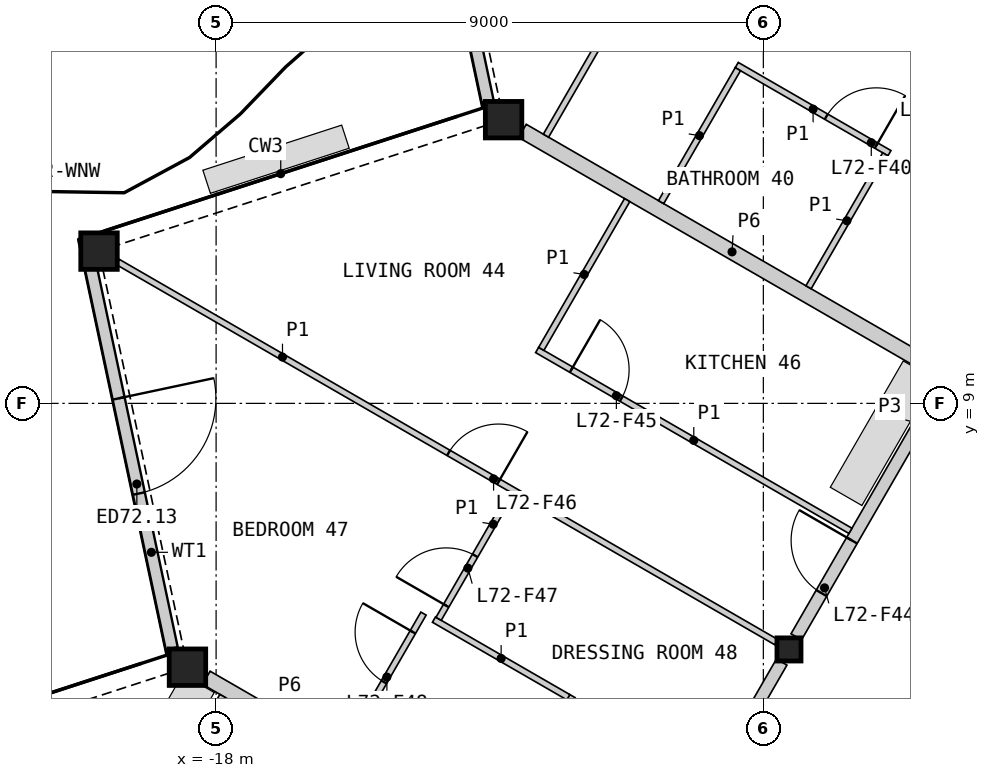
"""IFC4 building model, lengths in metres.
Left out: names, types, materials, properties, quantities, classifications, styles, units other than length and angle.
Written with IfcOpenShell. Run it as: python <this file> out.ifc"""

import sys

from ifc_helpers import new_model, si_unit, direction, frame, frame_2d, origin, origin_2d, place, context, subcontext, project, spatial, polyline, rectangle, hollow_rectangle, i_section, outline, extrude, element, fill, save


model = new_model("IFC4")
c1 = context("Model", 3, precision=1e-05, world=origin(), true_north=direction((0.0, 1.0)))
c2 = subcontext(c1, "Body", "Model", "MODEL_VIEW")
j1 = project(units=[si_unit("LENGTHUNIT", "METRE"), si_unit("PLANEANGLEUNIT", "RADIAN")], contexts=[c1])
p1 = place(None, origin())
s1 = spatial("IfcSite", under=j1, at=p1, CompositionType="ELEMENT")
p2 = place(p1, origin())
s2 = spatial("IfcBuilding", under=s1, at=p2, CompositionType="ELEMENT")
p3 = place(p2, frame((0.0, 0.0, 325.6)))
s3 = spatial("IfcBuildingStorey", under=s2, at=p3, CompositionType="ELEMENT", Elevation=325.6)
for number, where, z_axis, x_axis in (
    (1, (-13.272, 13.666, 0.0), (0.0, 0.0, 1.0), (1.0, 0.0, 0.0)),
    (2, (-19.926, 11.504, 0.0), (0.0, 0.0, 1.0), (1.0, 0.0, 0.0)),
    (3, (-18.471, 4.661, 0.0), (0.0, 0.0, 1.0), (1.0, 0.0, 0.0)),
):
    element("IfcColumn", number, at=place(p3, frame(where, z_axis=z_axis, x_axis=x_axis)), inside=s3, PredefinedType="COLUMN", context=c2, shape_type="SweptSolid", body=[
        extrude(hollow_rectangle(XDim=0.6, YDim=0.6, WallThickness=0.04, at=origin_2d()), origin(), (0.0, 0.0, 1.0), 3.4),
    ])
p4 = place(p3, frame((-8.578, 4.953, 0.0), z_axis=(0.0, 0.0, 1.0), x_axis=(1.0, 0.0, 0.0)))
e4 = element("IfcColumn", 4, at=p4, inside=s3, PredefinedType="COLUMN", context=c2, shape_type="SweptSolid", body=[
    extrude(i_section(OverallWidth=0.396, OverallDepth=0.381, WebThickness=0.019, FlangeThickness=0.03, at=origin_2d()), origin(), (0.0, 0.0, 1.0), 3.4),
])
p5 = place(p3, frame((-14.878, 20.292, 0.0), z_axis=(0.0, 0.0, 1.0), x_axis=(0.207943189785, -0.978140904892, 0.0)))
e5 = element("IfcWall", 5, at=p5, inside=s3, PredefinedType="SOLIDWALL", context=c2, shape_type="SweptSolid", body=[
    extrude(rectangle(XDim=6.467, YDim=0.2, at=frame_2d((3.233, 0.0))), origin(), (0.0, 0.0, 1.0), 2.488),
])
p6 = place(p5, frame((2.261, 0.0, 0.0)))
e6 = element("IfcOpeningElement", 6, at=p6, cuts=e5, PredefinedType="OPENING", context=c2, shape_type="SweptSolid", body=[
    extrude(rectangle(XDim=1.6, YDim=2.25, at=frame_2d((0.8, 1.125))), frame((0.0, 0.11, 0.0), z_axis=(0.0, -1.0, 0.0), x_axis=(1.0, 0.0, 0.0)), (0.0, 0.0, 1.0), 0.22),
])
p7 = place(p3, frame((-20.073, 11.294, 0.0), z_axis=(0.0, 0.0, 1.0), x_axis=(0.207893978909, -0.978151365349, 0.0)))
e7 = element("IfcWall", 7, at=p7, inside=s3, PredefinedType="SOLIDWALL", context=c2, shape_type="SweptSolid", body=[
    extrude(rectangle(XDim=6.466, YDim=0.2, at=frame_2d((3.233, 0.0))), origin(), (0.0, 0.0, 1.0), 2.488),
])
p8 = place(p7, frame((2.261, 0.0, 0.0)))
e8 = element("IfcOpeningElement", 8, at=p8, cuts=e7, PredefinedType="OPENING", context=c2, shape_type="SweptSolid", body=[
    extrude(rectangle(XDim=1.6, YDim=2.25, at=frame_2d((0.8, 1.125))), frame((0.0, 0.11, 0.0), z_axis=(0.0, -1.0, 0.0), x_axis=(1.0, 0.0, 0.0)), (0.0, 0.0, 1.0), 0.22),
])
p9 = place(p3, origin())
e9 = element("IfcWall", 9, at=p9, inside=s3, PredefinedType="SHEAR", context=c2, shape_type="SweptSolid", body=[
    extrude(outline(polyline([(-4.96, 0.208), (-7.131, 1.461), (-3.731, 7.35), (-1.561, 6.097), (-1.66, 5.924), (-3.652, 7.074), (-6.852, 1.531), (-4.861, 0.381), (-4.96, 0.208)])), origin(), (0.0, 0.0, 1.0), 3.1),
])
p10 = place(p3, frame((-3.794, 7.84, 0.0), z_axis=(0.0, 0.0, 1.0), x_axis=(-0.499974747889, -0.866039982607, 0.0)))
e10 = element("IfcWall", 10, at=p10, inside=s3, PredefinedType="SHEAR", context=c2, shape_type="SweptSolid", body=[
    extrude(rectangle(XDim=7.092, YDim=0.6, at=frame_2d((3.546, 0.0))), origin(), (0.0, 0.0, 1.0), 3.1),
])
p11 = place(p3, frame((-8.458, 5.16, 0.0), z_axis=(0.0, 0.0, 1.0), x_axis=(0.499984266882, 0.866034487114, 0.0)))
e11 = element("IfcWall", 11, at=p11, inside=s3, PredefinedType="PARTITIONING", context=c2, shape_type="SweptSolid", body=[
    extrude(rectangle(XDim=8.099, YDim=0.2, at=frame_2d((4.049, 0.0))), origin(), (0.0, 0.0, 1.0), 3.1),
])
p12 = place(p11, frame((5.935, 0.0, 0.0)))
e12 = element("IfcOpeningElement", 12, at=p12, cuts=e11, PredefinedType="OPENING", context=c2, shape_type="SweptSolid", body=[
    extrude(rectangle(XDim=1.0, YDim=2.1, at=frame_2d((0.5, 1.05))), frame((0.0, 0.11, 0.0), z_axis=(0.0, -1.0, 0.0), x_axis=(1.0, 0.0, 0.0)), (0.0, 0.0, 1.0), 0.22),
])
p13 = place(p11, frame((0.83, 0.0, 0.0)))
e13 = element("IfcOpeningElement", 13, at=p13, cuts=e11, PredefinedType="OPENING", context=c2, shape_type="SweptSolid", body=[
    extrude(rectangle(XDim=1.0, YDim=2.1, at=frame_2d((0.5, 1.05))), frame((0.0, 0.11, 0.0), z_axis=(0.0, -1.0, 0.0), x_axis=(1.0, 0.0, 0.0)), (0.0, 0.0, 1.0), 0.22),
])
p14 = place(p3, frame((-12.748, -2.269, 0.0), z_axis=(0.0, 0.0, 1.0), x_axis=(0.499984266882, 0.866034487114, 0.0)))
e14 = element("IfcWall", 14, at=p14, inside=s3, PredefinedType="PARTITIONING", context=c2, shape_type="SweptSolid", body=[
    extrude(rectangle(XDim=8.099, YDim=0.2, at=frame_2d((4.049, 0.0))), origin(), (0.0, 0.0, 1.0), 3.1),
])
p15 = place(p14, frame((1.164, 0.0, 0.0)))
e15 = element("IfcOpeningElement", 15, at=p15, cuts=e14, PredefinedType="OPENING", context=c2, shape_type="SweptSolid", body=[
    extrude(rectangle(XDim=1.0, YDim=2.1, at=frame_2d((0.5, 1.05))), frame((0.0, 0.11, 0.0), z_axis=(0.0, -1.0, 0.0), x_axis=(1.0, 0.0, 0.0)), (0.0, 0.0, 1.0), 0.22),
])
p16 = place(p3, frame((-12.962, 13.482, 0.0), z_axis=(0.0, 0.0, 1.0), x_axis=(0.866022671543, -0.50000473235, 0.0)))
e16 = element("IfcWall", 16, at=p16, inside=s3, PredefinedType="PARTITIONING", context=c2, shape_type="SweptSolid", body=[
    extrude(rectangle(XDim=7.961, YDim=0.25, at=frame_2d((3.98, 0.0))), origin(), (0.0, 0.0, 1.0), 2.33),
])
p17 = place(p3, frame((-18.161, 4.487, 0.0), z_axis=(0.0, 0.0, 1.0), x_axis=(0.866012646713, -0.500022095245, 0.0)))
e17 = element("IfcWall", 17, at=p17, inside=s3, PredefinedType="PARTITIONING", context=c2, shape_type="SweptSolid", body=[
    extrude(rectangle(XDim=2.516, YDim=0.25, at=frame_2d((1.258, 0.0))), origin(), (0.0, 0.0, 1.0), 2.33),
])
p18 = place(p3, frame((-14.417, 20.32, 0.0), z_axis=(0.0, 0.0, 1.0), x_axis=(0.866021216079, -0.500007253249, 0.0)))
e18 = element("IfcWall", 18, at=p18, inside=s3, PredefinedType="PARTITIONING", context=c2, shape_type="SweptSolid", body=[
    extrude(rectangle(XDim=12.639, YDim=0.1, at=frame_2d((6.32, 0.0))), origin(), (0.0, 0.0, 1.0), 2.33),
])
p19 = place(p18, frame((3.375, 0.0, 0.0)))
e19 = element("IfcOpeningElement", 19, at=p19, cuts=e18, PredefinedType="OPENING", context=c2, shape_type="SweptSolid", body=[
    extrude(rectangle(XDim=0.95, YDim=2.1, at=frame_2d((0.475, 1.05))), frame((0.0, 0.06, 0.0), z_axis=(0.0, -1.0, 0.0), x_axis=(1.0, 0.0, 0.0)), (0.0, 0.0, 1.0), 0.12),
])
p20 = place(p3, frame((-19.615, 11.325, 0.0), z_axis=(0.0, 0.0, 1.0), x_axis=(0.86602139559, -0.500006942333, 0.0)))
e20 = element("IfcWall", 20, at=p20, inside=s3, PredefinedType="PARTITIONING", context=c2, shape_type="SweptSolid", body=[
    extrude(rectangle(XDim=12.505, YDim=0.1, at=frame_2d((6.252, 0.0))), origin(), (0.0, 0.0, 1.0), 2.33),
])
p21 = place(p20, frame((6.28, 0.0, 0.0)))
e21 = element("IfcOpeningElement", 21, at=p21, cuts=e20, PredefinedType="OPENING", context=c2, shape_type="SweptSolid", body=[
    extrude(rectangle(XDim=0.95, YDim=2.1, at=frame_2d((0.475, 1.05))), frame((0.0, 0.06, 0.0), z_axis=(0.0, -1.0, 0.0), x_axis=(1.0, 0.0, 0.0)), (0.0, 0.0, 1.0), 0.12),
])
p22 = place(p3, frame((-12.721, 9.878, 0.0), z_axis=(0.0, 0.0, 1.0), x_axis=(0.866027751316, -0.499995933934, 0.0)))
e22 = element("IfcWall", 22, at=p22, inside=s3, PredefinedType="PARTITIONING", context=c2, shape_type="SweptSolid", body=[
    extrude(rectangle(XDim=5.95, YDim=0.1, at=frame_2d((2.975, 0.0))), origin(), (0.0, 0.0, 1.0), 2.33),
])
p23 = place(p22, frame((0.65, 0.0, 0.0)))
e23 = element("IfcOpeningElement", 23, at=p23, cuts=e22, PredefinedType="OPENING", context=c2, shape_type="SweptSolid", body=[
    extrude(rectangle(XDim=0.95, YDim=2.1, at=frame_2d((0.475, 1.05))), frame((0.0, 0.06, 0.0), z_axis=(0.0, -1.0, 0.0), x_axis=(1.0, 0.0, 0.0)), (0.0, 0.0, 1.0), 0.12),
])
p24 = place(p3, frame((-17.314, 0.823, 0.0), z_axis=(0.0, 0.0, 1.0), x_axis=(0.499988730927, 0.866031909889, 0.0)))
e24 = element("IfcWall", 24, at=p24, inside=s3, PredefinedType="PARTITIONING", context=c2, shape_type="SweptSolid", body=[
    extrude(rectangle(XDim=5.45, YDim=0.1, at=frame_2d((2.725, 0.0))), origin(), (0.0, 0.0, 1.0), 2.33),
])
p25 = place(p24, frame((4.15, 0.0, 0.0)))
e25 = element("IfcOpeningElement", 25, at=p25, cuts=e24, PredefinedType="OPENING", context=c2, shape_type="SweptSolid", body=[
    extrude(rectangle(XDim=0.95, YDim=2.1, at=frame_2d((0.475, 1.05))), frame((0.0, 0.06, 0.0), z_axis=(0.0, -1.0, 0.0), x_axis=(1.0, 0.0, 0.0)), (0.0, 0.0, 1.0), 0.12),
])
p26 = place(p3, frame((-14.889, -0.577, 0.0), z_axis=(0.0, 0.0, 1.0), x_axis=(0.500015767406, 0.866016300277, 0.0)))
e26 = element("IfcWall", 26, at=p26, inside=s3, PredefinedType="PARTITIONING", context=c2, shape_type="SweptSolid", body=[
    extrude(rectangle(XDim=5.5, YDim=0.1, at=frame_2d((2.75, 0.0))), origin(), (0.0, 0.0, 1.0), 2.33),
])
p27 = place(p3, frame((-12.575, 13.403, 0.0), z_axis=(0.0, 0.0, 1.0), x_axis=(0.499989096993, 0.866031698547, 0.0)))
e27 = element("IfcWall", 27, at=p27, inside=s3, PredefinedType="PARTITIONING", context=c2, shape_type="SweptSolid", body=[
    extrude(rectangle(XDim=5.02, YDim=0.1, at=frame_2d((2.51, 0.0))), origin(), (0.0, 0.0, 1.0), 2.33),
])
p28 = place(p27, frame((3.208, 0.0, 0.0)))
e28 = element("IfcOpeningElement", 28, at=p28, cuts=e27, PredefinedType="OPENING", context=c2, shape_type="SweptSolid", body=[
    extrude(rectangle(XDim=0.95, YDim=2.1, at=frame_2d((0.475, 1.05))), frame((0.0, 0.06, 0.0), z_axis=(0.0, -1.0, 0.0), x_axis=(1.0, 0.0, 0.0)), (0.0, 0.0, 1.0), 0.12),
])
p29 = place(p3, frame((-20.405, -0.158, 0.0), z_axis=(0.0, 0.0, 1.0), x_axis=(0.499989096993, 0.866031698547, 0.0)))
e29 = element("IfcWall", 29, at=p29, inside=s3, PredefinedType="PARTITIONING", context=c2, shape_type="SweptSolid", body=[
    extrude(rectangle(XDim=5.02, YDim=0.1, at=frame_2d((2.51, 0.0))), origin(), (0.0, 0.0, 1.0), 2.33),
])
p30 = place(p29, frame((0.862, 0.0, 0.0)))
e30 = element("IfcOpeningElement", 30, at=p30, cuts=e29, PredefinedType="OPENING", context=c2, shape_type="SweptSolid", body=[
    extrude(rectangle(XDim=0.95, YDim=2.1, at=frame_2d((0.475, 1.05))), frame((0.0, 0.06, 0.0), z_axis=(0.0, -1.0, 0.0), x_axis=(1.0, 0.0, 0.0)), (0.0, 0.0, 1.0), 0.12),
])
p31 = place(p3, frame((-12.652, 9.897, 0.0), z_axis=(0.0, 0.0, 1.0), x_axis=(0.500024172624, 0.866011447264, 0.0)))
e31 = element("IfcWall", 31, at=p31, inside=s3, PredefinedType="PARTITIONING", context=c2, shape_type="SweptSolid", body=[
    extrude(rectangle(XDim=2.825, YDim=0.1, at=frame_2d((1.413, 0.0))), origin(), (0.0, 0.0, 1.0), 2.33),
])
p32 = place(p3, frame((-9.438, 14.565, 0.0), z_axis=(0.0, 0.0, 1.0), x_axis=(0.866032775405, -0.499987231761, 0.0)))
e32 = element("IfcWall", 32, at=p32, inside=s3, PredefinedType="PARTITIONING", context=c2, shape_type="SweptSolid", body=[
    extrude(rectangle(XDim=2.9, YDim=0.1, at=frame_2d((1.45, 0.0))), origin(), (0.0, 0.0, 1.0), 2.33),
])
p33 = place(p32, frame((1.7, 0.0, 0.0)))
e33 = element("IfcOpeningElement", 33, at=p33, cuts=e32, PredefinedType="OPENING", context=c2, shape_type="SweptSolid", body=[
    extrude(rectangle(XDim=0.95, YDim=2.1, at=frame_2d((0.475, 1.05))), frame((0.0, 0.06, 0.0), z_axis=(0.0, -1.0, 0.0), x_axis=(1.0, 0.0, 0.0)), (0.0, 0.0, 1.0), 0.12),
])
for number, where, z_axis, x_axis in (
    (34, (-10.682, 12.31, 0.0), (0.0, 0.0, 1.0), (0.5, 0.866, 0.0)),
    (35, (-8.257, 10.91, 0.0), (0.0, 0.0, 1.0), (0.5, 0.866, 0.0)),
):
    element("IfcWall", number, at=place(p3, frame(where, z_axis=z_axis, x_axis=x_axis)), inside=s3, PredefinedType="PARTITIONING", context=c2, shape_type="SweptSolid", body=[
        extrude(rectangle(XDim=2.525, YDim=0.1, at=frame_2d((1.262, 0.0))), origin(), (0.0, 0.0, 1.0), 2.33),
    ])
p34 = place(p3, frame((-14.417, 5.443, 0.0), z_axis=(0.0, 0.0, 1.0), x_axis=(0.865991210529, -0.500059219779, 0.0)))
e36 = element("IfcWall", 36, at=p34, inside=s3, PredefinedType="PARTITIONING", context=c2, shape_type="SweptSolid", body=[
    extrude(rectangle(XDim=2.552, YDim=0.1, at=frame_2d((1.276, 0.0))), origin(), (0.0, 0.0, 1.0), 2.33),
])
p35 = place(p3, frame((-14.341, 5.457, 0.0), z_axis=(0.0, 0.0, 1.0), x_axis=(0.499954846121, 0.866051471819, 0.0)))
e37 = element("IfcWall", 37, at=p35, inside=s3, PredefinedType="PARTITIONING", context=c2, shape_type="SweptSolid", body=[
    extrude(rectangle(XDim=2.395, YDim=0.1, at=frame_2d((1.197, 0.0))), origin(), (0.0, 0.0, 1.0), 2.33),
])
p36 = place(p35, frame((0.25, 0.0, 0.0)))
e38 = element("IfcOpeningElement", 38, at=p36, cuts=e37, PredefinedType="OPENING", context=c2, shape_type="SweptSolid", body=[
    extrude(rectangle(XDim=0.95, YDim=2.1, at=frame_2d((0.475, 1.05))), frame((0.0, 0.06, 0.0), z_axis=(0.0, -1.0, 0.0), x_axis=(1.0, 0.0, 0.0)), (0.0, 0.0, 1.0), 0.12),
])
p37 = place(p8, origin())
e39 = element("IfcDoor", 39, at=p37, inside=s3, OperationType="DOUBLE_DOOR_SINGLE_SWING", PredefinedType="DOOR", context=c2, shape_type="SweptSolid", body=[
    extrude(rectangle(XDim=1.6, YDim=2.25, at=frame_2d((0.8, 1.125))), frame((0.0, 0.025, 0.0), z_axis=(0.0, -1.0, 0.0), x_axis=(1.0, 0.0, 0.0)), (0.0, 0.0, 1.0), 0.05),
])
fill(e8, e39)
p38 = place(p33, origin())
e40 = element("IfcDoor", 40, at=p38, inside=s3, OperationType="SINGLE_SWING_RIGHT", PredefinedType="DOOR", context=c2, shape_type="SweptSolid", body=[
    extrude(rectangle(XDim=0.95, YDim=2.1, at=frame_2d((0.475, 1.05))), frame((0.0, 0.025, 0.0), z_axis=(0.0, -1.0, 0.0), x_axis=(1.0, 0.0, 0.0)), (0.0, 0.0, 1.0), 0.05),
])
fill(e33, e40)
p39 = place(p13, origin())
e41 = element("IfcDoor", 41, at=p39, inside=s3, OperationType="SINGLE_SWING_RIGHT", PredefinedType="DOOR", context=c2, shape_type="SweptSolid", body=[
    extrude(rectangle(XDim=1.0, YDim=2.1, at=frame_2d((0.5, 1.05))), frame((0.0, 0.025, 0.0), z_axis=(0.0, -1.0, 0.0), x_axis=(1.0, 0.0, 0.0)), (0.0, 0.0, 1.0), 0.05),
])
fill(e13, e41)
p40 = place(p23, origin())
e42 = element("IfcDoor", 42, at=p40, inside=s3, OperationType="SINGLE_SWING_LEFT", PredefinedType="DOOR", context=c2, shape_type="SweptSolid", body=[
    extrude(rectangle(XDim=0.95, YDim=2.1, at=frame_2d((0.475, 1.05))), frame((0.0, 0.025, 0.0), z_axis=(0.0, -1.0, 0.0), x_axis=(1.0, 0.0, 0.0)), (0.0, 0.0, 1.0), 0.05),
])
fill(e23, e42)
p41 = place(p21, origin())
e43 = element("IfcDoor", 43, at=p41, inside=s3, OperationType="SINGLE_SWING_RIGHT", PredefinedType="DOOR", context=c2, shape_type="SweptSolid", body=[
    extrude(rectangle(XDim=0.95, YDim=2.1, at=frame_2d((0.475, 1.05))), frame((0.0, 0.025, 0.0), z_axis=(0.0, -1.0, 0.0), x_axis=(1.0, 0.0, 0.0)), (0.0, 0.0, 1.0), 0.05),
])
fill(e21, e43)
p42 = place(p36, origin())
e44 = element("IfcDoor", 44, at=p42, inside=s3, OperationType="SINGLE_SWING_LEFT", PredefinedType="DOOR", context=c2, shape_type="SweptSolid", body=[
    extrude(rectangle(XDim=0.95, YDim=2.1, at=frame_2d((0.475, 1.05))), frame((0.0, 0.025, 0.0), z_axis=(0.0, -1.0, 0.0), x_axis=(1.0, 0.0, 0.0)), (0.0, 0.0, 1.0), 0.05),
])
fill(e38, e44)
p43 = place(p25, origin())
e45 = element("IfcDoor", 45, at=p43, inside=s3, OperationType="SINGLE_SWING_RIGHT", PredefinedType="DOOR", context=c2, shape_type="SweptSolid", body=[
    extrude(rectangle(XDim=0.95, YDim=2.1, at=frame_2d((0.475, 1.05))), frame((0.0, 0.025, 0.0), z_axis=(0.0, -1.0, 0.0), x_axis=(1.0, 0.0, 0.0)), (0.0, 0.0, 1.0), 0.05),
])
fill(e25, e45)
save(model, sys.argv[1])
